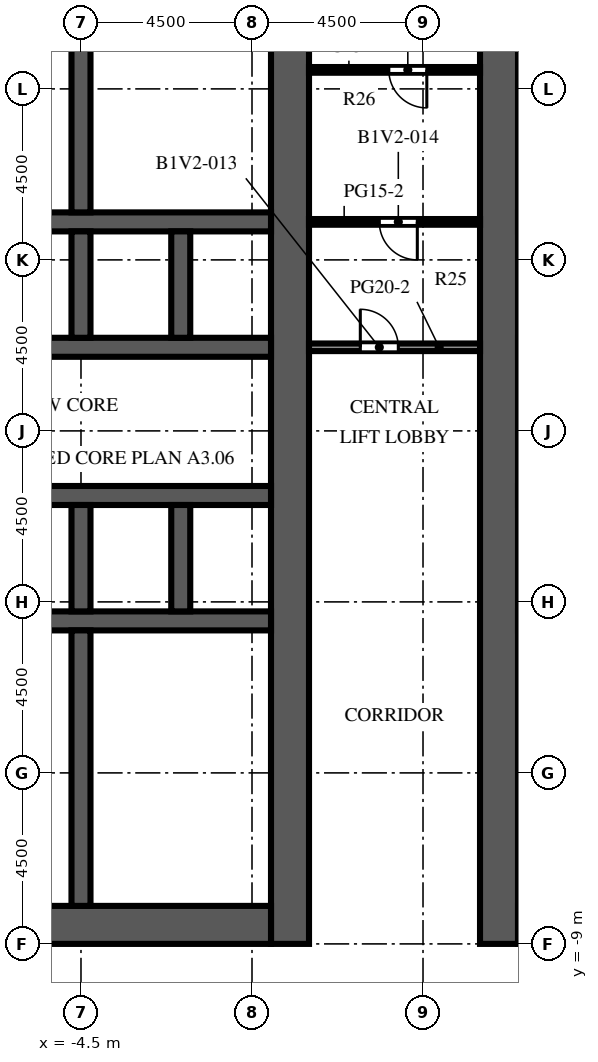
"""IFC4 building model, lengths in metres.
Left out: names, types, materials, properties, quantities, classifications, styles, units other than length and angle.
Written with IfcOpenShell. Run it as: python <this file> out.ifc"""

import sys

from ifc_helpers import new_model, si_unit, direction, frame, frame_2d, origin, place, context, subcontext, project, spatial, rectangle, extrude, element, fill, save


model = new_model("IFC4")
c1 = context("Model", 3, precision=1e-05, world=origin(), true_north=direction((0.0, 1.0)))
c2 = subcontext(c1, "Body", "Model", "MODEL_VIEW")
j1 = project(units=[si_unit("LENGTHUNIT", "METRE"), si_unit("PLANEANGLEUNIT", "RADIAN")], contexts=[c1])
p1 = place(None, origin())
s1 = spatial("IfcSite", under=j1, at=p1, CompositionType="ELEMENT")
p2 = place(p1, origin())
s2 = spatial("IfcBuilding", under=s1, at=p2, CompositionType="ELEMENT")
p3 = place(p2, frame((0.0, 0.0, 31.8)))
s3 = spatial("IfcBuildingStorey", under=s2, at=p3, CompositionType="ELEMENT", Elevation=31.8)
p4 = place(p3, frame((1.0, -9.0, 0.0), z_axis=(0.0, 0.0, 1.0), x_axis=(0.0, 1.0, 0.0)))
e1 = element("IfcWall", 1, at=p4, inside=s3, PredefinedType="SHEAR", context=c2, shape_type="SweptSolid", body=[
    extrude(rectangle(XDim=27.5, YDim=1.0, at=frame_2d((13.75, 0.0))), origin(), (0.0, 0.0, 1.0), 4.1),
])
p5 = place(p4, frame((12.55, 0.0, 0.0)))
e2 = element("IfcOpeningElement", 2, at=p5, cuts=e1, PredefinedType="OPENING", context=c2, shape_type="SweptSolid", body=[
    extrude(rectangle(XDim=2.4, YDim=2.4, at=frame_2d((1.2, 1.2))), frame((0.0, 0.51, 0.0), z_axis=(0.0, -1.0, 0.0), x_axis=(1.0, 0.0, 0.0)), (0.0, 0.0, 1.0), 1.02),
])
p6 = place(p4, frame((4.025, 0.0, 0.0)))
e3 = element("IfcOpeningElement", 3, at=p6, cuts=e1, PredefinedType="OPENING", context=c2, shape_type="SweptSolid", body=[
    extrude(rectangle(XDim=1.2, YDim=2.1, at=frame_2d((0.6, 1.05))), frame((0.0, 0.51, 0.0), z_axis=(0.0, -1.0, 0.0), x_axis=(1.0, 0.0, 0.0)), (0.0, 0.0, 1.0), 1.02),
])
p7 = place(p4, frame((19.475, 0.0, 0.0)))
e4 = element("IfcOpeningElement", 4, at=p7, cuts=e1, PredefinedType="OPENING", context=c2, shape_type="SweptSolid", body=[
    extrude(rectangle(XDim=1.0, YDim=2.1, at=frame_2d((0.5, 1.05))), frame((0.0, 0.51, 0.0), z_axis=(0.0, -1.0, 0.0), x_axis=(1.0, 0.0, 0.0)), (0.0, 0.0, 1.0), 1.02),
])
p8 = place(p4, frame((21.106, 0.0, 0.0)))
e5 = element("IfcOpeningElement", 5, at=p8, cuts=e1, PredefinedType="OPENING", context=c2, shape_type="SweptSolid", body=[
    extrude(rectangle(XDim=1.0, YDim=2.1, at=frame_2d((0.5, 1.05))), frame((0.0, 0.51, 0.0), z_axis=(0.0, -1.0, 0.0), x_axis=(1.0, 0.0, 0.0)), (0.0, 0.0, 1.0), 1.02),
])
p9 = place(p4, frame((23.1, 0.0, 0.0)))
e6 = element("IfcOpeningElement", 6, at=p9, cuts=e1, PredefinedType="OPENING", context=c2, shape_type="SweptSolid", body=[
    extrude(rectangle(XDim=1.0, YDim=2.1, at=frame_2d((0.5, 1.05))), frame((0.0, 0.51, 0.0), z_axis=(0.0, -1.0, 0.0), x_axis=(1.0, 0.0, 0.0)), (0.0, 0.0, 1.0), 1.02),
])
p10 = place(p4, frame((25.094, 0.0, 0.0)))
e7 = element("IfcOpeningElement", 7, at=p10, cuts=e1, PredefinedType="OPENING", context=c2, shape_type="SweptSolid", body=[
    extrude(rectangle(XDim=1.0, YDim=2.1, at=frame_2d((0.5, 1.05))), frame((0.0, 0.51, 0.0), z_axis=(0.0, -1.0, 0.0), x_axis=(1.0, 0.0, 0.0)), (0.0, 0.0, 1.0), 1.02),
])
p11 = place(p3, frame((-9.5, -8.5, 0.0), z_axis=(0.0, 0.0, 1.0), x_axis=(1.0, 0.0, 0.0)))
e8 = element("IfcWall", 8, at=p11, inside=s3, PredefinedType="SHEAR", context=c2, shape_type="SweptSolid", body=[
    extrude(rectangle(XDim=10.0, YDim=1.0, at=frame_2d((5.0, 0.0))), origin(), (0.0, 0.0, 1.0), 4.1),
])
p12 = place(p3, frame((-9.5, -0.5, 0.0), z_axis=(0.0, 0.0, 1.0), x_axis=(1.0, 0.0, 0.0)))
e9 = element("IfcWall", 9, at=p12, inside=s3, PredefinedType="SHEAR", context=c2, shape_type="SweptSolid", body=[
    extrude(rectangle(XDim=10.0, YDim=0.5, at=frame_2d((5.0, 0.0))), origin(), (0.0, 0.0, 1.0), 4.1),
])
p13 = place(p3, frame((-9.5, 2.8, 0.0), z_axis=(0.0, 0.0, 1.0), x_axis=(1.0, 0.0, 0.0)))
e10 = element("IfcWall", 10, at=p13, inside=s3, PredefinedType="SHEAR", context=c2, shape_type="SweptSolid", body=[
    extrude(rectangle(XDim=10.0, YDim=0.5, at=frame_2d((5.0, 0.0))), origin(), (0.0, 0.0, 1.0), 4.1),
])
p14 = place(p13, frame((0.512, 0.0, 0.0)))
e11 = element("IfcOpeningElement", 11, at=p14, cuts=e10, PredefinedType="OPENING", context=c2, shape_type="SweptSolid", body=[
    extrude(rectangle(XDim=1.1, YDim=2.1, at=frame_2d((0.55, 1.05))), frame((0.0, 0.26, 0.0), z_axis=(0.0, -1.0, 0.0), x_axis=(1.0, 0.0, 0.0)), (0.0, 0.0, 1.0), 0.52),
])
p15 = place(p13, frame((3.137, 0.0, 0.0)))
e12 = element("IfcOpeningElement", 12, at=p15, cuts=e10, PredefinedType="OPENING", context=c2, shape_type="SweptSolid", body=[
    extrude(rectangle(XDim=1.1, YDim=2.1, at=frame_2d((0.55, 1.05))), frame((0.0, 0.26, 0.0), z_axis=(0.0, -1.0, 0.0), x_axis=(1.0, 0.0, 0.0)), (0.0, 0.0, 1.0), 0.52),
])
p16 = place(p13, frame((8.387, 0.0, 0.0)))
e13 = element("IfcOpeningElement", 13, at=p16, cuts=e10, PredefinedType="OPENING", context=c2, shape_type="SweptSolid", body=[
    extrude(rectangle(XDim=1.1, YDim=2.1, at=frame_2d((0.55, 1.05))), frame((0.0, 0.26, 0.0), z_axis=(0.0, -1.0, 0.0), x_axis=(1.0, 0.0, 0.0)), (0.0, 0.0, 1.0), 0.52),
])
p17 = place(p3, frame((-9.5, 6.7, 0.0), z_axis=(0.0, 0.0, 1.0), x_axis=(1.0, 0.0, 0.0)))
e14 = element("IfcWall", 14, at=p17, inside=s3, PredefinedType="SHEAR", context=c2, shape_type="SweptSolid", body=[
    extrude(rectangle(XDim=10.0, YDim=0.5, at=frame_2d((5.0, 0.0))), origin(), (0.0, 0.0, 1.0), 4.1),
])
p18 = place(p17, frame((0.512, 0.0, 0.0)))
e15 = element("IfcOpeningElement", 15, at=p18, cuts=e14, PredefinedType="OPENING", context=c2, shape_type="SweptSolid", body=[
    extrude(rectangle(XDim=1.1, YDim=2.1, at=frame_2d((0.55, 1.05))), frame((0.0, 0.26, 0.0), z_axis=(0.0, -1.0, 0.0), x_axis=(1.0, 0.0, 0.0)), (0.0, 0.0, 1.0), 0.52),
])
p19 = place(p17, frame((3.188, 0.0, 0.0)))
e16 = element("IfcOpeningElement", 16, at=p19, cuts=e14, PredefinedType="OPENING", context=c2, shape_type="SweptSolid", body=[
    extrude(rectangle(XDim=1.0, YDim=2.1, at=frame_2d((0.5, 1.05))), frame((0.0, 0.26, 0.0), z_axis=(0.0, -1.0, 0.0), x_axis=(1.0, 0.0, 0.0)), (0.0, 0.0, 1.0), 0.52),
])
p20 = place(p17, frame((5.812, 0.0, 0.0)))
e17 = element("IfcOpeningElement", 17, at=p20, cuts=e14, PredefinedType="OPENING", context=c2, shape_type="SweptSolid", body=[
    extrude(rectangle(XDim=1.0, YDim=2.1, at=frame_2d((0.5, 1.05))), frame((0.0, 0.26, 0.0), z_axis=(0.0, -1.0, 0.0), x_axis=(1.0, 0.0, 0.0)), (0.0, 0.0, 1.0), 0.52),
])
p21 = place(p17, frame((8.438, 0.0, 0.0)))
e18 = element("IfcOpeningElement", 18, at=p21, cuts=e14, PredefinedType="OPENING", context=c2, shape_type="SweptSolid", body=[
    extrude(rectangle(XDim=1.0, YDim=2.1, at=frame_2d((0.5, 1.05))), frame((0.0, 0.26, 0.0), z_axis=(0.0, -1.0, 0.0), x_axis=(1.0, 0.0, 0.0)), (0.0, 0.0, 1.0), 0.52),
])
p22 = place(p3, frame((-9.5, 10.0, 0.0), z_axis=(0.0, 0.0, 1.0), x_axis=(1.0, 0.0, 0.0)))
e19 = element("IfcWall", 19, at=p22, inside=s3, PredefinedType="SHEAR", context=c2, shape_type="SweptSolid", body=[
    extrude(rectangle(XDim=10.0, YDim=0.5, at=frame_2d((5.0, 0.0))), origin(), (0.0, 0.0, 1.0), 4.1),
])
for number, where, z_axis, x_axis in (
    (20, (-4.5, -0.25, 0.0), (0.0, 0.0, 1.0), (0.0, 1.0, 0.0)),
    (21, (-4.5, 6.95, 0.0), (0.0, 0.0, 1.0), (0.0, 1.0, 0.0)),
    (22, (-1.875, -0.25, 0.0), (0.0, 0.0, 1.0), (0.0, 1.0, 0.0)),
    (23, (-1.875, 6.95, 0.0), (0.0, 0.0, 1.0), (0.0, 1.0, 0.0)),
):
    element("IfcWall", number, at=place(p3, frame(where, z_axis=z_axis, x_axis=x_axis)), inside=s3, PredefinedType="SHEAR", context=c2, shape_type="SweptSolid", body=[
        extrude(rectangle(XDim=2.8, YDim=0.5, at=frame_2d((1.4, 0.0))), origin(), (0.0, 0.0, 1.0), 4.1),
    ])
for number, where, z_axis, x_axis in (
    (24, (-4.5, -8.0, 0.0), (0.0, 0.0, 1.0), (0.0, 1.0, 0.0)),
    (25, (-4.5, 10.25, 0.0), (0.0, 0.0, 1.0), (0.0, 1.0, 0.0)),
):
    element("IfcWall", number, at=place(p3, frame(where, z_axis=z_axis, x_axis=x_axis)), inside=s3, PredefinedType="SHEAR", context=c2, shape_type="SweptSolid", body=[
        extrude(rectangle(XDim=7.25, YDim=0.5, at=frame_2d((3.625, 0.0))), origin(), (0.0, 0.0, 1.0), 4.1),
    ])
p23 = place(p3, frame((6.5, -9.0, 0.0), z_axis=(0.0, 0.0, 1.0), x_axis=(0.0, 1.0, 0.0)))
e26 = element("IfcWall", 26, at=p23, inside=s3, PredefinedType="SHEAR", context=c2, shape_type="SweptSolid", body=[
    extrude(rectangle(XDim=27.5, YDim=1.0, at=frame_2d((13.75, 0.0))), origin(), (0.0, 0.0, 1.0), 4.1),
])
p24 = place(p23, frame((12.55, 0.0, 0.0)))
e27 = element("IfcOpeningElement", 27, at=p24, cuts=e26, PredefinedType="OPENING", context=c2, shape_type="SweptSolid", body=[
    extrude(rectangle(XDim=2.4, YDim=2.4, at=frame_2d((1.2, 1.2))), frame((0.0, 0.51, 0.0), z_axis=(0.0, -1.0, 0.0), x_axis=(1.0, 0.0, 0.0)), (0.0, 0.0, 1.0), 1.02),
])
p25 = place(p23, frame((4.025, 0.0, 0.0)))
e28 = element("IfcOpeningElement", 28, at=p25, cuts=e26, PredefinedType="OPENING", context=c2, shape_type="SweptSolid", body=[
    extrude(rectangle(XDim=1.2, YDim=2.1, at=frame_2d((0.6, 1.05))), frame((0.0, 0.51, 0.0), z_axis=(0.0, -1.0, 0.0), x_axis=(1.0, 0.0, 0.0)), (0.0, 0.0, 1.0), 1.02),
])
p26 = place(p23, frame((19.475, 0.0, 0.0)))
e29 = element("IfcOpeningElement", 29, at=p26, cuts=e26, PredefinedType="OPENING", context=c2, shape_type="SweptSolid", body=[
    extrude(rectangle(XDim=1.0, YDim=2.1, at=frame_2d((0.5, 1.05))), frame((0.0, 0.51, 0.0), z_axis=(0.0, -1.0, 0.0), x_axis=(1.0, 0.0, 0.0)), (0.0, 0.0, 1.0), 1.02),
])
p27 = place(p23, frame((21.106, 0.0, 0.0)))
e30 = element("IfcOpeningElement", 30, at=p27, cuts=e26, PredefinedType="OPENING", context=c2, shape_type="SweptSolid", body=[
    extrude(rectangle(XDim=1.0, YDim=2.1, at=frame_2d((0.5, 1.05))), frame((0.0, 0.51, 0.0), z_axis=(0.0, -1.0, 0.0), x_axis=(1.0, 0.0, 0.0)), (0.0, 0.0, 1.0), 1.02),
])
p28 = place(p23, frame((23.1, 0.0, 0.0)))
e31 = element("IfcOpeningElement", 31, at=p28, cuts=e26, PredefinedType="OPENING", context=c2, shape_type="SweptSolid", body=[
    extrude(rectangle(XDim=1.0, YDim=2.1, at=frame_2d((0.5, 1.05))), frame((0.0, 0.51, 0.0), z_axis=(0.0, -1.0, 0.0), x_axis=(1.0, 0.0, 0.0)), (0.0, 0.0, 1.0), 1.02),
])
p29 = place(p23, frame((25.094, 0.0, 0.0)))
e32 = element("IfcOpeningElement", 32, at=p29, cuts=e26, PredefinedType="OPENING", context=c2, shape_type="SweptSolid", body=[
    extrude(rectangle(XDim=1.0, YDim=2.1, at=frame_2d((0.5, 1.05))), frame((0.0, 0.51, 0.0), z_axis=(0.0, -1.0, 0.0), x_axis=(1.0, 0.0, 0.0)), (0.0, 0.0, 1.0), 1.02),
])
p30 = place(p3, frame((-1.1, -5.825, 0.0), z_axis=(0.0, 0.0, 1.0), x_axis=(1.0, 0.0, 0.0)))
e33 = element("IfcWall", 33, at=p30, inside=s3, PredefinedType="PARTITIONING", context=c2, shape_type="SweptSolid", body=[
    extrude(rectangle(XDim=1.6, YDim=0.1, at=frame_2d((0.8, 0.0))), origin(), (0.0, 0.0, 1.0), 3.5),
])
p31 = place(p30, frame((0.3, 0.0, 0.0)))
e34 = element("IfcOpeningElement", 34, at=p31, cuts=e33, PredefinedType="OPENING", context=c2, shape_type="SweptSolid", body=[
    extrude(rectangle(XDim=1.0, YDim=2.1, at=frame_2d((0.5, 1.05))), frame((0.0, 0.06, 0.0), z_axis=(0.0, -1.0, 0.0), x_axis=(1.0, 0.0, 0.0)), (0.0, 0.0, 1.0), 0.12),
])
p32 = place(p3, frame((-1.1, -2.925, 0.0), z_axis=(0.0, 0.0, 1.0), x_axis=(1.0, 0.0, 0.0)))
e35 = element("IfcWall", 35, at=p32, inside=s3, PredefinedType="PARTITIONING", context=c2, shape_type="SweptSolid", body=[
    extrude(rectangle(XDim=1.6, YDim=0.1, at=frame_2d((0.8, 0.0))), origin(), (0.0, 0.0, 1.0), 3.5),
])
p33 = place(p32, frame((0.3, 0.0, 0.0)))
e36 = element("IfcOpeningElement", 36, at=p33, cuts=e35, PredefinedType="OPENING", context=c2, shape_type="SweptSolid", body=[
    extrude(rectangle(XDim=1.0, YDim=2.1, at=frame_2d((0.5, 1.05))), frame((0.0, 0.06, 0.0), z_axis=(0.0, -1.0, 0.0), x_axis=(1.0, 0.0, 0.0)), (0.0, 0.0, 1.0), 0.12),
])
p34 = place(p3, frame((-1.1, -5.825, 0.0), z_axis=(0.0, 0.0, 1.0), x_axis=(0.0, 1.0, 0.0)))
e37 = element("IfcWall", 37, at=p34, inside=s3, PredefinedType="PARTITIONING", context=c2, shape_type="SweptSolid", body=[
    extrude(rectangle(XDim=2.9, YDim=0.1, at=frame_2d((1.45, 0.0))), origin(), (0.0, 0.0, 1.0), 3.5),
])
p35 = place(p34, frame((0.95, 0.0, 0.0)))
e38 = element("IfcOpeningElement", 38, at=p35, cuts=e37, PredefinedType="OPENING", context=c2, shape_type="SweptSolid", body=[
    extrude(rectangle(XDim=1.0, YDim=2.1, at=frame_2d((0.5, 1.05))), frame((0.0, 0.06, 0.0), z_axis=(0.0, -1.0, 0.0), x_axis=(1.0, 0.0, 0.0)), (0.0, 0.0, 1.0), 0.12),
])
for number, where, z_axis, x_axis in (
    (39, (-4.25, -5.825, 0.0), (0.0, 0.0, 1.0), (1.0, 0.0, 0.0)),
    (40, (-4.25, -2.925, 0.0), (0.0, 0.0, 1.0), (1.0, 0.0, 0.0)),
):
    element("IfcWall", number, at=place(p3, frame(where, z_axis=z_axis, x_axis=x_axis)), inside=s3, PredefinedType="PARTITIONING", context=c2, shape_type="SweptSolid", body=[
        extrude(rectangle(XDim=3.15, YDim=0.1, at=frame_2d((1.575, 0.0))), origin(), (0.0, 0.0, 1.0), 3.5),
    ])
for number, where, z_axis, x_axis in (
    (41, (-4.25, 11.7, 0.0), (0.0, 0.0, 1.0), (1.0, 0.0, 0.0)),
    (42, (-4.25, 13.512, 0.0), (0.0, 0.0, 1.0), (1.0, 0.0, 0.0)),
):
    element("IfcWall", number, at=place(p3, frame(where, z_axis=z_axis, x_axis=x_axis)), inside=s3, PredefinedType="PARTITIONING", context=c2, shape_type="SweptSolid", body=[
        extrude(rectangle(XDim=4.75, YDim=0.1, at=frame_2d((2.375, 0.0))), origin(), (0.0, 0.0, 1.0), 3.5),
    ])
p36 = place(p3, frame((1.5, 6.7, 0.0), z_axis=(0.0, 0.0, 1.0), x_axis=(1.0, 0.0, 0.0)))
e43 = element("IfcWall", 43, at=p36, inside=s3, PredefinedType="PARTITIONING", context=c2, shape_type="SweptSolid", body=[
    extrude(rectangle(XDim=4.5, YDim=0.2, at=frame_2d((2.25, 0.0))), origin(), (0.0, 0.0, 1.0), 3.5),
])
p37 = place(p36, frame((1.35, 0.0, 0.0)))
e44 = element("IfcOpeningElement", 44, at=p37, cuts=e43, PredefinedType="OPENING", context=c2, shape_type="SweptSolid", body=[
    extrude(rectangle(XDim=1.0, YDim=2.1, at=frame_2d((0.5, 1.05))), frame((0.0, 0.11, 0.0), z_axis=(0.0, -1.0, 0.0), x_axis=(1.0, 0.0, 0.0)), (0.0, 0.0, 1.0), 0.22),
])
p38 = place(p3, frame((1.5, 10.0, 0.0), z_axis=(0.0, 0.0, 1.0), x_axis=(1.0, 0.0, 0.0)))
e45 = element("IfcWall", 45, at=p38, inside=s3, PredefinedType="PARTITIONING", context=c2, shape_type="SweptSolid", body=[
    extrude(rectangle(XDim=4.5, YDim=0.15, at=frame_2d((2.25, 0.0))), origin(), (0.0, 0.0, 1.0), 3.5),
])
p39 = place(p38, frame((1.85, 0.0, 0.0)))
e46 = element("IfcOpeningElement", 46, at=p39, cuts=e45, PredefinedType="OPENING", context=c2, shape_type="SweptSolid", body=[
    extrude(rectangle(XDim=1.0, YDim=2.1, at=frame_2d((0.5, 1.05))), frame((0.0, 0.085, 0.0), z_axis=(0.0, -1.0, 0.0), x_axis=(1.0, 0.0, 0.0)), (0.0, 0.0, 1.0), 0.17),
])
p40 = place(p3, frame((1.5, 14.0, 0.0), z_axis=(0.0, 0.0, 1.0), x_axis=(1.0, 0.0, 0.0)))
e47 = element("IfcWall", 47, at=p40, inside=s3, PredefinedType="PARTITIONING", context=c2, shape_type="SweptSolid", body=[
    extrude(rectangle(XDim=4.5, YDim=0.15, at=frame_2d((2.25, 0.0))), origin(), (0.0, 0.0, 1.0), 3.5),
])
p41 = place(p40, frame((2.1, 0.0, 0.0)))
e48 = element("IfcOpeningElement", 48, at=p41, cuts=e47, PredefinedType="OPENING", context=c2, shape_type="SweptSolid", body=[
    extrude(rectangle(XDim=1.0, YDim=2.1, at=frame_2d((0.5, 1.05))), frame((0.0, 0.085, 0.0), z_axis=(0.0, -1.0, 0.0), x_axis=(1.0, 0.0, 0.0)), (0.0, 0.0, 1.0), 0.17),
])
p42 = place(p16, origin())
e49 = element("IfcDoor", 49, at=p42, inside=s3, OperationType="DOUBLE_DOOR_SLIDING", PredefinedType="DOOR", context=c2, shape_type="SweptSolid", body=[
    extrude(rectangle(XDim=1.1, YDim=2.1, at=frame_2d((0.55, 1.05))), frame((0.0, 0.025, 0.0), z_axis=(0.0, -1.0, 0.0), x_axis=(1.0, 0.0, 0.0)), (0.0, 0.0, 1.0), 0.05),
])
fill(e13, e49)
p43 = place(p5, origin())
e50 = element("IfcDoor", 50, at=p43, inside=s3, OperationType="DOUBLE_DOOR_DOUBLE_SWING", PredefinedType="DOOR", context=c2, shape_type="SweptSolid", body=[
    extrude(rectangle(XDim=2.4, YDim=2.4, at=frame_2d((1.2, 1.2))), frame((0.0, 0.025, 0.0), z_axis=(0.0, -1.0, 0.0), x_axis=(1.0, 0.0, 0.0)), (0.0, 0.0, 1.0), 0.05),
])
fill(e2, e50)
p44 = place(p24, origin())
e51 = element("IfcDoor", 51, at=p44, inside=s3, OperationType="DOUBLE_DOOR_DOUBLE_SWING", PredefinedType="DOOR", context=c2, shape_type="SweptSolid", body=[
    extrude(rectangle(XDim=2.4, YDim=2.4, at=frame_2d((1.2, 1.2))), frame((0.0, 0.025, 0.0), z_axis=(0.0, -1.0, 0.0), x_axis=(1.0, 0.0, 0.0)), (0.0, 0.0, 1.0), 0.05),
])
fill(e27, e51)
p45 = place(p20, origin())
e52 = element("IfcDoor", 52, at=p45, inside=s3, OperationType="SINGLE_SWING_LEFT", PredefinedType="DOOR", context=c2, shape_type="SweptSolid", body=[
    extrude(rectangle(XDim=1.0, YDim=2.1, at=frame_2d((0.5, 1.05))), frame((0.0, 0.025, 0.0), z_axis=(0.0, -1.0, 0.0), x_axis=(1.0, 0.0, 0.0)), (0.0, 0.0, 1.0), 0.05),
])
fill(e17, e52)
p46 = place(p21, origin())
e53 = element("IfcDoor", 53, at=p46, inside=s3, OperationType="SINGLE_SWING_RIGHT", PredefinedType="DOOR", context=c2, shape_type="SweptSolid", body=[
    extrude(rectangle(XDim=1.0, YDim=2.1, at=frame_2d((0.5, 1.05))), frame((0.0, 0.025, 0.0), z_axis=(0.0, -1.0, 0.0), x_axis=(1.0, 0.0, 0.0)), (0.0, 0.0, 1.0), 0.05),
])
fill(e18, e53)
p47 = place(p6, origin())
e54 = element("IfcDoor", 54, at=p47, inside=s3, OperationType="SINGLE_SWING_LEFT", PredefinedType="DOOR", context=c2, shape_type="SweptSolid", body=[
    extrude(rectangle(XDim=1.2, YDim=2.1, at=frame_2d((0.6, 1.05))), frame((0.0, 0.475, 0.0), z_axis=(0.0, -1.0, 0.0), x_axis=(1.0, 0.0, 0.0)), (0.0, 0.0, 1.0), 0.05),
])
fill(e3, e54)
p48 = place(p31, origin())
e55 = element("IfcDoor", 55, at=p48, inside=s3, OperationType="SINGLE_SWING_RIGHT", PredefinedType="DOOR", context=c2, shape_type="SweptSolid", body=[
    extrude(rectangle(XDim=1.0, YDim=2.1, at=frame_2d((0.5, 1.05))), frame((0.0, 0.025, 0.0), z_axis=(0.0, -1.0, 0.0), x_axis=(1.0, 0.0, 0.0)), (0.0, 0.0, 1.0), 0.05),
])
fill(e34, e55)
p49 = place(p33, origin())
e56 = element("IfcDoor", 56, at=p49, inside=s3, OperationType="SINGLE_SWING_LEFT", PredefinedType="DOOR", context=c2, shape_type="SweptSolid", body=[
    extrude(rectangle(XDim=1.0, YDim=2.1, at=frame_2d((0.5, 1.05))), frame((0.0, 0.025, 0.0), z_axis=(0.0, -1.0, 0.0), x_axis=(1.0, 0.0, 0.0)), (0.0, 0.0, 1.0), 0.05),
])
fill(e36, e56)
p50 = place(p35, origin())
e57 = element("IfcDoor", 57, at=p50, inside=s3, OperationType="SINGLE_SWING_RIGHT", PredefinedType="DOOR", context=c2, shape_type="SweptSolid", body=[
    extrude(rectangle(XDim=1.0, YDim=2.1, at=frame_2d((0.5, 1.05))), frame((0.0, 0.025, 0.0), z_axis=(0.0, -1.0, 0.0), x_axis=(1.0, 0.0, 0.0)), (0.0, 0.0, 1.0), 0.05),
])
fill(e38, e57)
p51 = place(p7, origin())
e58 = element("IfcDoor", 58, at=p51, inside=s3, OperationType="SINGLE_SWING_LEFT", PredefinedType="DOOR", context=c2, shape_type="SweptSolid", body=[
    extrude(rectangle(XDim=1.0, YDim=2.1, at=frame_2d((0.5, 1.05))), frame((0.0, 0.475, 0.0), z_axis=(0.0, -1.0, 0.0), x_axis=(1.0, 0.0, 0.0)), (0.0, 0.0, 1.0), 0.05),
])
fill(e4, e58)
p52 = place(p8, origin())
e59 = element("IfcDoor", 59, at=p52, inside=s3, OperationType="SINGLE_SWING_RIGHT", PredefinedType="DOOR", context=c2, shape_type="SweptSolid", body=[
    extrude(rectangle(XDim=1.0, YDim=2.1, at=frame_2d((0.5, 1.05))), frame((0.0, 0.475, 0.0), z_axis=(0.0, -1.0, 0.0), x_axis=(1.0, 0.0, 0.0)), (0.0, 0.0, 1.0), 0.05),
])
fill(e5, e59)
p53 = place(p9, origin())
e60 = element("IfcDoor", 60, at=p53, inside=s3, OperationType="SINGLE_SWING_LEFT", PredefinedType="DOOR", context=c2, shape_type="SweptSolid", body=[
    extrude(rectangle(XDim=1.0, YDim=2.1, at=frame_2d((0.5, 1.05))), frame((0.0, 0.475, 0.0), z_axis=(0.0, -1.0, 0.0), x_axis=(1.0, 0.0, 0.0)), (0.0, 0.0, 1.0), 0.05),
])
fill(e6, e60)
p54 = place(p25, origin())
e61 = element("IfcDoor", 61, at=p54, inside=s3, OperationType="SINGLE_SWING_RIGHT", PredefinedType="DOOR", context=c2, shape_type="SweptSolid", body=[
    extrude(rectangle(XDim=1.2, YDim=2.1, at=frame_2d((0.6, 1.05))), frame((0.0, -0.425, 0.0), z_axis=(0.0, -1.0, 0.0), x_axis=(1.0, 0.0, 0.0)), (0.0, 0.0, 1.0), 0.05),
])
fill(e28, e61)
p55 = place(p26, origin())
e62 = element("IfcDoor", 62, at=p55, inside=s3, OperationType="SINGLE_SWING_RIGHT", PredefinedType="DOOR", context=c2, shape_type="SweptSolid", body=[
    extrude(rectangle(XDim=1.0, YDim=2.1, at=frame_2d((0.5, 1.05))), frame((0.0, -0.425, 0.0), z_axis=(0.0, -1.0, 0.0), x_axis=(1.0, 0.0, 0.0)), (0.0, 0.0, 1.0), 0.05),
])
fill(e29, e62)
p56 = place(p27, origin())
e63 = element("IfcDoor", 63, at=p56, inside=s3, OperationType="SINGLE_SWING_LEFT", PredefinedType="DOOR", context=c2, shape_type="SweptSolid", body=[
    extrude(rectangle(XDim=1.0, YDim=2.1, at=frame_2d((0.5, 1.05))), frame((0.0, -0.425, 0.0), z_axis=(0.0, -1.0, 0.0), x_axis=(1.0, 0.0, 0.0)), (0.0, 0.0, 1.0), 0.05),
])
fill(e30, e63)
p57 = place(p28, origin())
e64 = element("IfcDoor", 64, at=p57, inside=s3, OperationType="SINGLE_SWING_RIGHT", PredefinedType="DOOR", context=c2, shape_type="SweptSolid", body=[
    extrude(rectangle(XDim=1.0, YDim=2.1, at=frame_2d((0.5, 1.05))), frame((0.0, -0.425, 0.0), z_axis=(0.0, -1.0, 0.0), x_axis=(1.0, 0.0, 0.0)), (0.0, 0.0, 1.0), 0.05),
])
fill(e31, e64)
p58 = place(p37, origin())
e65 = element("IfcDoor", 65, at=p58, inside=s3, OperationType="SINGLE_SWING_LEFT", PredefinedType="DOOR", context=c2, shape_type="SweptSolid", body=[
    extrude(rectangle(XDim=1.0, YDim=2.1, at=frame_2d((0.5, 1.05))), frame((0.0, 0.025, 0.0), z_axis=(0.0, -1.0, 0.0), x_axis=(1.0, 0.0, 0.0)), (0.0, 0.0, 1.0), 0.05),
])
fill(e44, e65)
p59 = place(p39, origin())
e66 = element("IfcDoor", 66, at=p59, inside=s3, OperationType="SINGLE_SWING_RIGHT", PredefinedType="DOOR", context=c2, shape_type="SweptSolid", body=[
    extrude(rectangle(XDim=1.0, YDim=2.1, at=frame_2d((0.5, 1.05))), frame((0.0, 0.025, 0.0), z_axis=(0.0, -1.0, 0.0), x_axis=(1.0, 0.0, 0.0)), (0.0, 0.0, 1.0), 0.05),
])
fill(e46, e66)
p60 = place(p41, origin())
e67 = element("IfcDoor", 67, at=p60, inside=s3, OperationType="SINGLE_SWING_RIGHT", PredefinedType="DOOR", context=c2, shape_type="SweptSolid", body=[
    extrude(rectangle(XDim=1.0, YDim=2.1, at=frame_2d((0.5, 1.05))), frame((0.0, 0.025, 0.0), z_axis=(0.0, -1.0, 0.0), x_axis=(1.0, 0.0, 0.0)), (0.0, 0.0, 1.0), 0.05),
])
fill(e48, e67)
save(model, sys.argv[1])
